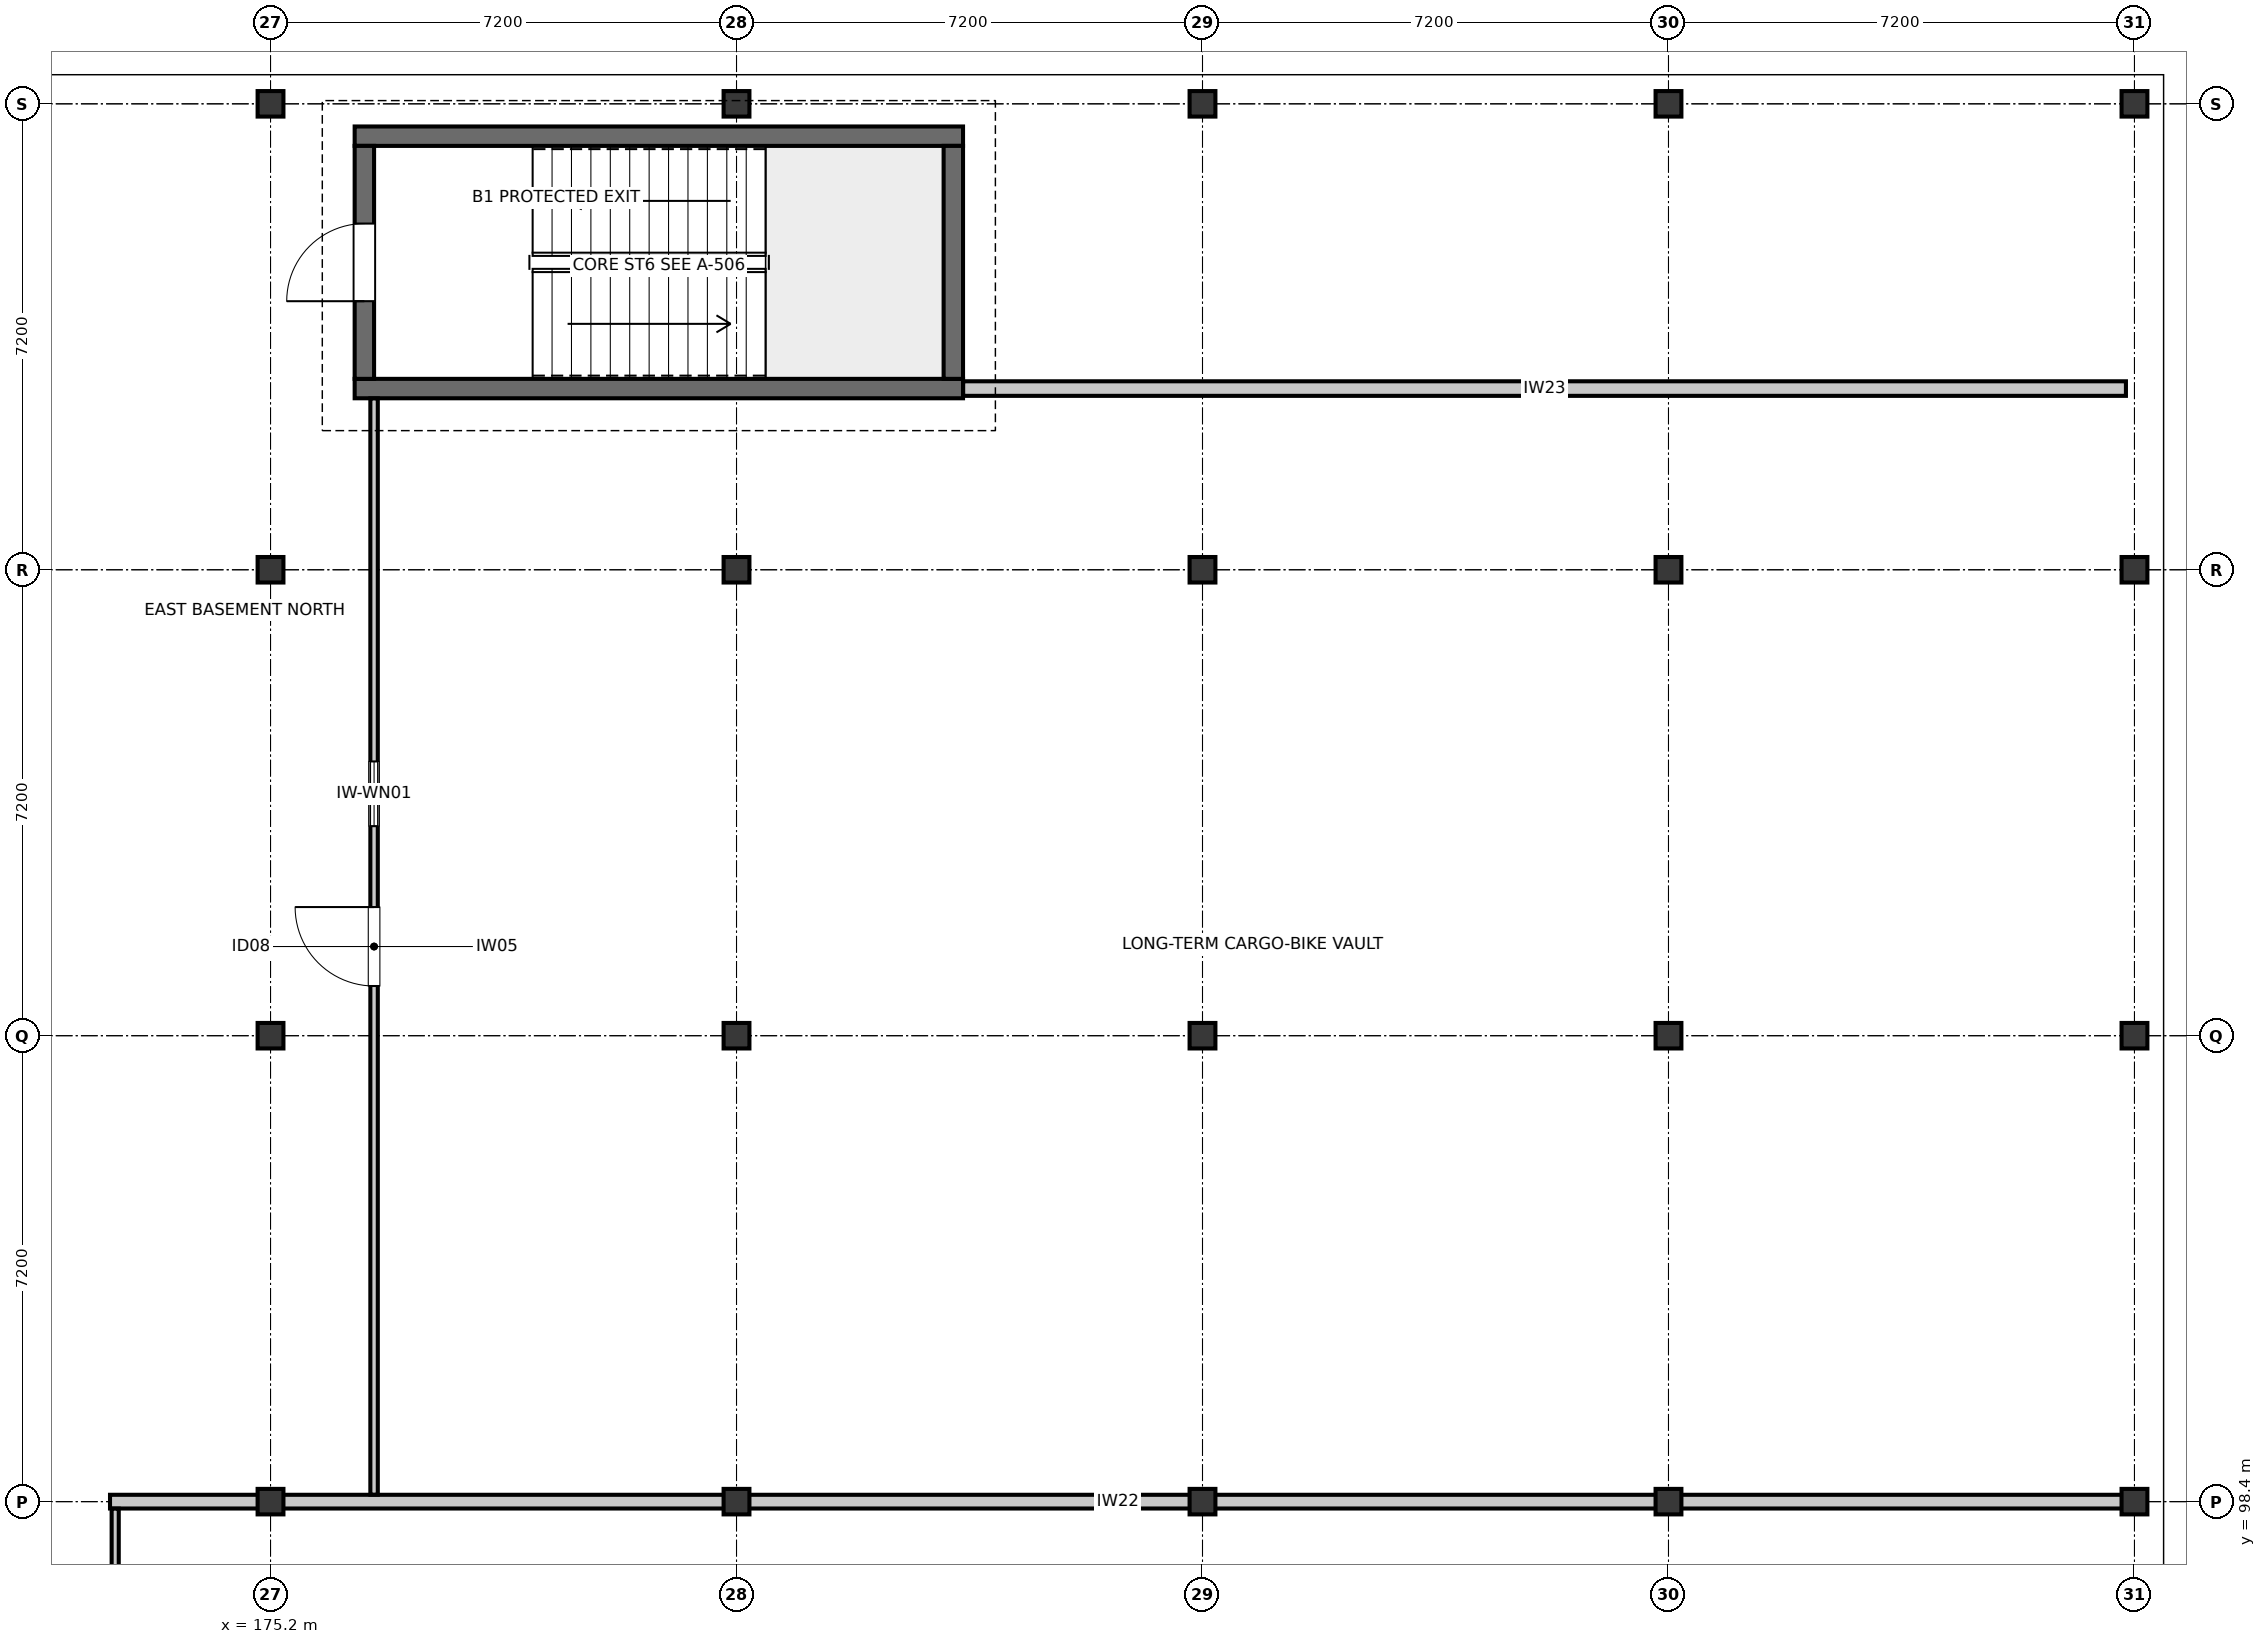
"""IFC4 building model, lengths in metres.
Left out: names, types, materials, properties, quantities, classifications, styles, units other than length and angle.
Written with IfcOpenShell. Run it as: python <this file> out.ifc"""

import sys

from ifc_helpers import new_model, si_unit, direction, frame, frame_2d, origin, origin_2d, place, context, subcontext, project, spatial, rectangle, i_section, extrude, element, fill, save


model = new_model("IFC4")
c1 = context("Model", 3, precision=1e-05, world=origin(), true_north=direction((0.0, 1.0)))
c2 = subcontext(c1, "Body", "Model", "MODEL_VIEW")
j1 = project(units=[si_unit("LENGTHUNIT", "METRE"), si_unit("PLANEANGLEUNIT", "RADIAN")], contexts=[c1])
p1 = place(None, origin())
s1 = spatial("IfcSite", under=j1, at=p1, CompositionType="ELEMENT")
p2 = place(p1, origin())
s2 = spatial("IfcBuilding", under=s1, at=p2, CompositionType="ELEMENT")
p3 = place(p2, frame((0.0, 0.0, -4.5)))
s3 = spatial("IfcBuildingStorey", under=s2, at=p3, CompositionType="ELEMENT", Elevation=-4.5)
for number, where, z_axis, x_axis in (
    (1, (175.2, 98.4, 0.0), (0.0, 0.0, 1.0), (1.0, 0.0, 0.0)),
    (2, (175.2, 105.6, 0.0), (0.0, 0.0, 1.0), (1.0, 0.0, 0.0)),
    (3, (175.2, 112.8, 0.0), (0.0, 0.0, 1.0), (1.0, 0.0, 0.0)),
    (4, (175.2, 120.0, 0.0), (0.0, 0.0, 1.0), (1.0, 0.0, 0.0)),
    (5, (182.4, 98.4, 0.0), (0.0, 0.0, 1.0), (1.0, 0.0, 0.0)),
    (6, (182.4, 105.6, 0.0), (0.0, 0.0, 1.0), (1.0, 0.0, 0.0)),
    (7, (182.4, 112.8, 0.0), (0.0, 0.0, 1.0), (1.0, 0.0, 0.0)),
    (8, (182.4, 120.0, 0.0), (0.0, 0.0, 1.0), (1.0, 0.0, 0.0)),
    (9, (189.6, 98.4, 0.0), (0.0, 0.0, 1.0), (1.0, 0.0, 0.0)),
    (10, (189.6, 105.6, 0.0), (0.0, 0.0, 1.0), (1.0, 0.0, 0.0)),
    (11, (189.6, 112.8, 0.0), (0.0, 0.0, 1.0), (1.0, 0.0, 0.0)),
    (12, (189.6, 120.0, 0.0), (0.0, 0.0, 1.0), (1.0, 0.0, 0.0)),
    (13, (196.8, 98.4, 0.0), (0.0, 0.0, 1.0), (1.0, 0.0, 0.0)),
    (14, (196.8, 105.6, 0.0), (0.0, 0.0, 1.0), (1.0, 0.0, 0.0)),
    (15, (196.8, 112.8, 0.0), (0.0, 0.0, 1.0), (1.0, 0.0, 0.0)),
    (16, (196.8, 120.0, 0.0), (0.0, 0.0, 1.0), (1.0, 0.0, 0.0)),
    (17, (204.0, 98.4, 0.0), (0.0, 0.0, 1.0), (1.0, 0.0, 0.0)),
    (18, (204.0, 105.6, 0.0), (0.0, 0.0, 1.0), (1.0, 0.0, 0.0)),
    (19, (204.0, 112.8, 0.0), (0.0, 0.0, 1.0), (1.0, 0.0, 0.0)),
    (20, (204.0, 120.0, 0.0), (0.0, 0.0, 1.0), (1.0, 0.0, 0.0)),
):
    element("IfcColumn", number, at=place(p3, frame(where, z_axis=z_axis, x_axis=x_axis)), inside=s3, PredefinedType="COLUMN", context=c2, shape_type="SweptSolid", body=[
        extrude(i_section(OverallWidth=0.399, OverallDepth=0.394, WebThickness=0.023, FlangeThickness=0.037, FilletRadius=0.015, at=origin_2d()), origin(), (0.0, 0.0, 1.0), 4.5),
    ])
for number, where, z_axis, x_axis in (
    (21, (185.9, 115.6, 0.0), (0.0, 0.0, 1.0), (-1.0, 0.0, 0.0)),
    (22, (176.5, 119.5, 0.0), (0.0, 0.0, 1.0), (1.0, 0.0, 0.0)),
):
    element("IfcWall", number, at=place(p3, frame(where, z_axis=z_axis, x_axis=x_axis)), inside=s3, PredefinedType="SOLIDWALL", context=c2, shape_type="SweptSolid", body=[
        extrude(rectangle(XDim=9.4, YDim=0.3, at=frame_2d((4.7, 0.0))), origin(), (0.0, 0.0, 1.0), 4.18),
    ])
p4 = place(p3, frame((176.65, 115.75, 0.0), z_axis=(0.0, 0.0, 1.0), x_axis=(0.0, 1.0, 0.0)))
e23 = element("IfcWall", 23, at=p4, inside=s3, PredefinedType="SOLIDWALL", context=c2, shape_type="SweptSolid", body=[
    extrude(rectangle(XDim=3.6, YDim=0.3, at=frame_2d((1.8, 0.0))), origin(), (0.0, 0.0, 1.0), 4.18),
])
p5 = place(p4, frame((1.2, 0.0, 0.0)))
e24 = element("IfcOpeningElement", 24, at=p5, cuts=e23, PredefinedType="OPENING", context=c2, shape_type="SweptSolid", body=[
    extrude(rectangle(XDim=1.2, YDim=2.2, at=frame_2d((0.6, 1.1))), frame((0.0, 0.16, 0.0), z_axis=(0.0, -1.0, 0.0), x_axis=(1.0, 0.0, 0.0)), (0.0, 0.0, 1.0), 0.32),
])
p6 = place(p3, frame((185.75, 119.35, 0.0), z_axis=(0.0, 0.0, 1.0), x_axis=(0.0, -1.0, 0.0)))
e25 = element("IfcWall", 25, at=p6, inside=s3, PredefinedType="SOLIDWALL", context=c2, shape_type="SweptSolid", body=[
    extrude(rectangle(XDim=3.6, YDim=0.3, at=frame_2d((1.8, 0.0))), origin(), (0.0, 0.0, 1.0), 4.18),
])
p7 = place(p3, frame((172.72, 98.4, 0.0), z_axis=(0.0, 0.0, 1.0), x_axis=(1.0, 0.0, 0.0)))
e26 = element("IfcWall", 26, at=p7, inside=s3, PredefinedType="PARTITIONING", context=c2, shape_type="SweptSolid", body=[
    extrude(rectangle(XDim=31.148, YDim=0.212, at=frame_2d((15.574, 0.0))), origin(), (0.0, 0.0, 1.0), 3.403),
])
p8 = place(p3, frame((185.902, 115.6, 0.0), z_axis=(0.0, 0.0, 1.0), x_axis=(1.0, 0.0, 0.0)))
e27 = element("IfcWall", 27, at=p8, inside=s3, PredefinedType="PARTITIONING", context=c2, shape_type="SweptSolid", body=[
    extrude(rectangle(XDim=17.966, YDim=0.225, at=frame_2d((8.983, 0.0))), origin(), (0.0, 0.0, 1.0), 3.403),
])
p9 = place(p3, frame((172.8, 76.904, 0.0), z_axis=(0.0, 0.0, 1.0), x_axis=(0.0, 1.0, 0.0)))
e28 = element("IfcWall", 28, at=p9, inside=s3, PredefinedType="PARTITIONING", context=c2, shape_type="SweptSolid", body=[
    extrude(rectangle(XDim=21.388, YDim=0.11, at=frame_2d((10.694, 0.0))), origin(), (0.0, 0.0, 1.0), 3.403),
])
p10 = place(p9, frame((10.119, 0.0, 0.0)))
e29 = element("IfcOpeningElement", 29, at=p10, cuts=e28, PredefinedType="OPENING", context=c2, shape_type="SweptSolid", body=[
    extrude(rectangle(XDim=1.15, YDim=2.1, at=frame_2d((0.575, 1.05))), frame((0.0, 0.065, 0.0), z_axis=(0.0, -1.0, 0.0), x_axis=(1.0, 0.0, 0.0)), (0.0, 0.0, 1.0), 0.13),
])
p11 = place(p3, frame((176.8, 98.508, 0.0), z_axis=(0.0, 0.0, 1.0), x_axis=(0.0, 1.0, 0.0)))
e30 = element("IfcWall", 30, at=p11, inside=s3, PredefinedType="PARTITIONING", context=c2, shape_type="SweptSolid", body=[
    extrude(rectangle(XDim=16.94, YDim=0.115, at=frame_2d((8.47, 0.0))), origin(), (0.0, 0.0, 1.0), 3.403),
])
p12 = place(p11, frame((7.86, 0.0, 0.0)))
e31 = element("IfcOpeningElement", 31, at=p12, cuts=e30, PredefinedType="OPENING", context=c2, shape_type="SweptSolid", body=[
    extrude(rectangle(XDim=1.22, YDim=2.1, at=frame_2d((0.61, 1.05))), frame((0.0, 0.067, 0.0), z_axis=(0.0, -1.0, 0.0), x_axis=(1.0, 0.0, 0.0)), (0.0, 0.0, 1.0), 0.135),
])
p13 = place(p11, frame((10.33, 0.0, 0.95)))
e32 = element("IfcOpeningElement", 32, at=p13, cuts=e30, PredefinedType="OPENING", context=c2, shape_type="SweptSolid", body=[
    extrude(rectangle(XDim=1.0, YDim=1.0, at=frame_2d((0.5, 0.5))), frame((0.0, 0.067, 0.0), z_axis=(0.0, -1.0, 0.0), x_axis=(1.0, 0.0, 0.0)), (0.0, 0.0, 1.0), 0.135),
])
p14 = place(p5, origin())
e33 = element("IfcDoor", 33, at=p14, inside=s3, OperationType="SINGLE_SWING_LEFT", PredefinedType="DOOR", context=c2, shape_type="SweptSolid", body=[
    extrude(rectangle(XDim=1.2, YDim=2.2, at=frame_2d((0.6, 1.1))), frame((0.0, 0.025, 0.0), z_axis=(0.0, -1.0, 0.0), x_axis=(1.0, 0.0, 0.0)), (0.0, 0.0, 1.0), 0.05),
])
fill(e24, e33)
p15 = place(p12, origin())
e34 = element("IfcDoor", 34, at=p15, inside=s3, OperationType="SINGLE_SWING_RIGHT", PredefinedType="DOOR", context=c2, shape_type="SweptSolid", body=[
    extrude(rectangle(XDim=1.22, YDim=2.1, at=frame_2d((0.61, 1.05))), frame((0.0, 0.025, 0.0), z_axis=(0.0, -1.0, 0.0), x_axis=(1.0, 0.0, 0.0)), (0.0, 0.0, 1.0), 0.05),
])
fill(e31, e34)
p16 = place(p13, origin())
e35 = element("IfcWindow", 35, at=p16, inside=s3, PartitioningType="SINGLE_PANEL", PredefinedType="WINDOW", context=c2, shape_type="SweptSolid", body=[
    extrude(rectangle(XDim=1.0, YDim=1.0, at=frame_2d((0.5, 0.5))), frame((0.0, 0.03, 0.0), z_axis=(0.0, -1.0, 0.0), x_axis=(1.0, 0.0, 0.0)), (0.0, 0.0, 1.0), 0.06),
])
fill(e32, e35)
save(model, sys.argv[1])
